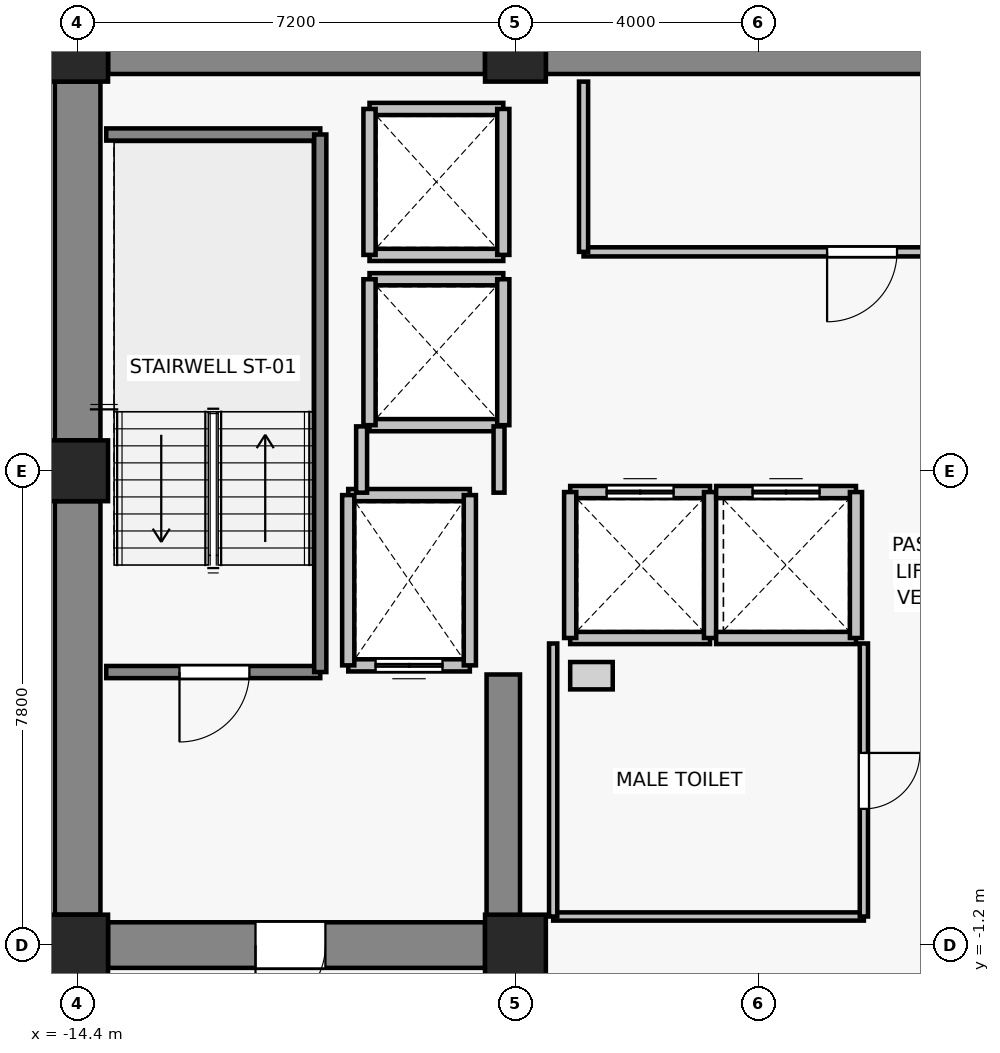
"""IFC4 building model, lengths in metres.
Left out: names, types, materials, properties, quantities, classifications, styles, units other than length and angle.
Written with IfcOpenShell. Run it as: python <this file> out.ifc"""

import sys

from ifc_helpers import new_model, si_unit, direction, frame, frame_2d, origin, origin_2d, place, context, subcontext, project, spatial, rectangle, extrude, source, transform, mapped, element, fill, save


model = new_model("IFC4")
c1 = context("Model", 3, precision=1e-05, world=origin(), true_north=direction((0.0, 1.0)))
c2 = subcontext(c1, "Body", "Model", "MODEL_VIEW")
j1 = project(units=[si_unit("LENGTHUNIT", "METRE"), si_unit("PLANEANGLEUNIT", "RADIAN")], contexts=[c1])
p1 = place(None, origin())
s1 = spatial("IfcSite", under=j1, at=p1, CompositionType="ELEMENT")
p2 = place(p1, origin())
s2 = spatial("IfcBuilding", under=s1, at=p2, CompositionType="ELEMENT")
p3 = place(p2, frame((0.0, 0.0, 103.3)))
s3 = spatial("IfcBuildingStorey", under=s2, at=p3, CompositionType="ELEMENT", Elevation=103.3)
for number, where, z_axis, x_axis in (
    (1, (-14.4, -1.2, 0.0), (0.0, 0.0, 1.0), (1.0, 0.0, 0.0)),
    (2, (-7.2, -1.2, 0.0), (0.0, 0.0, 1.0), (1.0, 0.0, 0.0)),
    (3, (-14.4, 6.6, 0.0), (0.0, 0.0, 1.0), (1.0, 0.0, 0.0)),
    (4, (-14.4, 13.5, 0.0), (0.0, 0.0, 1.0), (1.0, 0.0, 0.0)),
    (5, (-7.2, 13.5, 0.0), (0.0, 0.0, 1.0), (1.0, 0.0, 0.0)),
):
    element("IfcColumn", number, at=place(p3, frame(where, z_axis=z_axis, x_axis=x_axis)), inside=s3, PredefinedType="COLUMN", context=c2, shape_type="SweptSolid", body=[
        extrude(rectangle(XDim=1.0, YDim=1.0, at=origin_2d()), origin(), (0.0, 0.0, 1.0), 3.3),
    ])
p4 = place(p3, frame((-13.9, 13.5, 0.0), z_axis=(0.0, 0.0, 1.0), x_axis=(1.0, 0.0, 0.0)))
e6 = element("IfcWall", 6, at=p4, inside=s3, PredefinedType="SHEAR", context=c2, shape_type="SweptSolid", body=[
    extrude(rectangle(XDim=6.2, YDim=0.75, at=frame_2d((3.1, 0.0))), origin(), (0.0, 0.0, 1.0), 3.075),
])
p5 = place(p3, frame((-6.7, 13.5, 0.0), z_axis=(0.0, 0.0, 1.0), x_axis=(1.0, 0.0, 0.0)))
e7 = element("IfcWall", 7, at=p5, inside=s3, PredefinedType="SHEAR", context=c2, shape_type="SweptSolid", body=[
    extrude(rectangle(XDim=13.4, YDim=0.75, at=frame_2d((6.7, 0.0))), origin(), (0.0, 0.0, 1.0), 3.075),
])
p6 = place(p3, frame((-14.4, -0.7, 0.0), z_axis=(0.0, 0.0, 1.0), x_axis=(0.0, 1.0, 0.0)))
e8 = element("IfcWall", 8, at=p6, inside=s3, PredefinedType="SHEAR", context=c2, shape_type="SweptSolid", body=[
    extrude(rectangle(XDim=6.8, YDim=0.75, at=frame_2d((3.4, 0.0))), origin(), (0.0, 0.0, 1.0), 3.075),
])
p7 = place(p3, frame((-14.4, 7.1, 0.0), z_axis=(0.0, 0.0, 1.0), x_axis=(0.0, 1.0, 0.0)))
e9 = element("IfcWall", 9, at=p7, inside=s3, PredefinedType="SHEAR", context=c2, shape_type="SweptSolid", body=[
    extrude(rectangle(XDim=5.9, YDim=0.75, at=frame_2d((2.95, 0.0))), origin(), (0.0, 0.0, 1.0), 3.075),
])
p8 = place(p3, frame((-7.7, -1.2, 0.0), z_axis=(0.0, 0.0, 1.0), x_axis=(-1.0, 0.0, 0.0)))
e10 = element("IfcWall", 10, at=p8, inside=s3, PredefinedType="SHEAR", context=c2, shape_type="SweptSolid", body=[
    extrude(rectangle(XDim=6.2, YDim=0.75, at=frame_2d((3.1, 0.0))), origin(), (0.0, 0.0, 1.0), 3.075),
])
p9 = place(p8, frame((2.625, 0.0, 0.0)))
e11 = element("IfcOpeningElement", 11, at=p9, cuts=e10, PredefinedType="OPENING", context=c2, shape_type="SweptSolid", body=[
    extrude(rectangle(XDim=1.15, YDim=2.15, at=frame_2d((0.575, 1.075))), frame((0.0, 0.385, 0.0), z_axis=(0.0, -1.0, 0.0), x_axis=(1.0, 0.0, 0.0)), (0.0, 0.0, 1.0), 0.77),
])
p10 = place(p3, frame((-7.4, -0.825, 0.0), z_axis=(0.0, 0.0, 1.0), x_axis=(0.0, 1.0, 0.0)))
e12 = element("IfcWall", 12, at=p10, inside=s3, PredefinedType="SHEAR", context=c2, shape_type="SweptSolid", body=[
    extrude(rectangle(XDim=4.075, YDim=0.55, at=frame_2d((2.038, 0.0))), origin(), (0.0, 0.0, 1.0), 3.075),
])
p11 = place(p3, frame((-7.95, 3.4, 0.0), z_axis=(0.0, 0.0, 1.0), x_axis=(-1.0, 0.0, 0.0)))
e13 = element("IfcWall", 13, at=p11, inside=s3, PredefinedType="SOLIDWALL", context=c2, shape_type="SweptSolid", body=[
    extrude(rectangle(XDim=2.0, YDim=0.2, at=frame_2d((1.0, 0.0))), origin(), (0.0, 0.0, 1.0), 3.075),
])
p12 = place(p11, frame((0.45, 0.0, 0.0)))
e14 = element("IfcOpeningElement", 14, at=p12, cuts=e13, PredefinedType="OPENING", context=c2, shape_type="SweptSolid", body=[
    extrude(rectangle(XDim=1.1, YDim=2.2, at=frame_2d((0.55, 1.1))), frame((0.0, 0.11, 0.0), z_axis=(0.0, -1.0, 0.0), x_axis=(1.0, 0.0, 0.0)), (0.0, 0.0, 1.0), 0.22),
])
p13 = place(p3, frame((-9.95, 6.2, 0.0), z_axis=(0.0, 0.0, 1.0), x_axis=(1.0, 0.0, 0.0)))
e15 = element("IfcWall", 15, at=p13, inside=s3, PredefinedType="SOLIDWALL", context=c2, shape_type="SweptSolid", body=[
    extrude(rectangle(XDim=2.0, YDim=0.2, at=frame_2d((1.0, 0.0))), origin(), (0.0, 0.0, 1.0), 3.075),
])
for number, where, z_axis, x_axis in (
    (16, (-9.95, 3.4, 0.0), (0.0, 0.0, 1.0), (0.0, 1.0, 0.0)),
    (17, (-7.95, 6.2, 0.0), (0.0, 0.0, 1.0), (0.0, -1.0, 0.0)),
):
    element("IfcWall", number, at=place(p3, frame(where, z_axis=z_axis, x_axis=x_axis)), inside=s3, PredefinedType="SOLIDWALL", context=c2, shape_type="SweptSolid", body=[
        extrude(rectangle(XDim=2.8, YDim=0.2, at=frame_2d((1.4, 0.0))), origin(), (0.0, 0.0, 1.0), 3.075),
    ])
p14 = place(p3, frame((-4.0, 3.85, 0.0), z_axis=(0.0, 0.0, 1.0), x_axis=(-1.0, 0.0, 0.0)))
e18 = element("IfcWall", 18, at=p14, inside=s3, PredefinedType="SOLIDWALL", context=c2, shape_type="SweptSolid", body=[
    extrude(rectangle(XDim=2.3, YDim=0.2, at=frame_2d((1.15, 0.0))), origin(), (0.0, 0.0, 1.0), 3.075),
])
p15 = place(p3, frame((-6.3, 6.25, 0.0), z_axis=(0.0, 0.0, 1.0), x_axis=(1.0, 0.0, 0.0)))
e19 = element("IfcWall", 19, at=p15, inside=s3, PredefinedType="SOLIDWALL", context=c2, shape_type="SweptSolid", body=[
    extrude(rectangle(XDim=2.3, YDim=0.2, at=frame_2d((1.15, 0.0))), origin(), (0.0, 0.0, 1.0), 3.075),
])
p16 = place(p15, frame((0.6, 0.0, 0.0)))
e20 = element("IfcOpeningElement", 20, at=p16, cuts=e19, PredefinedType="OPENING", context=c2, shape_type="SweptSolid", body=[
    extrude(rectangle(XDim=1.1, YDim=2.2, at=frame_2d((0.55, 1.1))), frame((0.0, 0.11, 0.0), z_axis=(0.0, -1.0, 0.0), x_axis=(1.0, 0.0, 0.0)), (0.0, 0.0, 1.0), 0.22),
])
for number, where, z_axis, x_axis in (
    (21, (-6.3, 3.85, 0.0), (0.0, 0.0, 1.0), (0.0, 1.0, 0.0)),
    (22, (-4.0, 6.25, 0.0), (0.0, 0.0, 1.0), (0.0, -1.0, 0.0)),
):
    element("IfcWall", number, at=place(p3, frame(where, z_axis=z_axis, x_axis=x_axis)), inside=s3, PredefinedType="SOLIDWALL", context=c2, shape_type="SweptSolid", body=[
        extrude(rectangle(XDim=2.4, YDim=0.2, at=frame_2d((1.2, 0.0))), origin(), (0.0, 0.0, 1.0), 3.075),
    ])
p17 = place(p3, frame((-1.6, 3.85, 0.0), z_axis=(0.0, 0.0, 1.0), x_axis=(-1.0, 0.0, 0.0)))
e23 = element("IfcWall", 23, at=p17, inside=s3, PredefinedType="SOLIDWALL", context=c2, shape_type="SweptSolid", body=[
    extrude(rectangle(XDim=2.3, YDim=0.2, at=frame_2d((1.15, 0.0))), origin(), (0.0, 0.0, 1.0), 3.075),
])
p18 = place(p3, frame((-3.9, 6.25, 0.0), z_axis=(0.0, 0.0, 1.0), x_axis=(1.0, 0.0, 0.0)))
e24 = element("IfcWall", 24, at=p18, inside=s3, PredefinedType="SOLIDWALL", context=c2, shape_type="SweptSolid", body=[
    extrude(rectangle(XDim=2.3, YDim=0.2, at=frame_2d((1.15, 0.0))), origin(), (0.0, 0.0, 1.0), 3.075),
])
p19 = place(p18, frame((0.6, 0.0, 0.0)))
e25 = element("IfcOpeningElement", 25, at=p19, cuts=e24, PredefinedType="OPENING", context=c2, shape_type="SweptSolid", body=[
    extrude(rectangle(XDim=1.1, YDim=2.2, at=frame_2d((0.55, 1.1))), frame((0.0, 0.11, 0.0), z_axis=(0.0, -1.0, 0.0), x_axis=(1.0, 0.0, 0.0)), (0.0, 0.0, 1.0), 0.22),
])
p20 = place(p3, frame((-1.6, 6.25, 0.0), z_axis=(0.0, 0.0, 1.0), x_axis=(0.0, -1.0, 0.0)))
e26 = element("IfcWall", 26, at=p20, inside=s3, PredefinedType="SOLIDWALL", context=c2, shape_type="SweptSolid", body=[
    extrude(rectangle(XDim=2.4, YDim=0.2, at=frame_2d((1.2, 0.0))), origin(), (0.0, 0.0, 1.0), 3.075),
])
for number, where, z_axis, x_axis in (
    (27, (-7.4, 7.35, 0.0), (0.0, 0.0, 1.0), (-1.0, 0.0, 0.0)),
    (28, (-9.6, 9.75, 0.0), (0.0, 0.0, 1.0), (1.0, 0.0, 0.0)),
):
    element("IfcWall", number, at=place(p3, frame(where, z_axis=z_axis, x_axis=x_axis)), inside=s3, PredefinedType="SOLIDWALL", context=c2, shape_type="SweptSolid", body=[
        extrude(rectangle(XDim=2.2, YDim=0.2, at=frame_2d((1.1, 0.0))), origin(), (0.0, 0.0, 1.0), 2.515),
    ])
p21 = place(p3, frame((-9.6, 7.35, 0.0), z_axis=(0.0, 0.0, 1.0), x_axis=(0.0, 1.0, 0.0)))
e29 = element("IfcWall", 29, at=p21, inside=s3, PredefinedType="SOLIDWALL", context=c2, shape_type="SweptSolid", body=[
    extrude(rectangle(XDim=2.4, YDim=0.2, at=frame_2d((1.2, 0.0))), origin(), (0.0, 0.0, 1.0), 3.075),
])
p22 = place(p3, frame((-7.4, 9.75, 0.0), z_axis=(0.0, 0.0, 1.0), x_axis=(0.0, -1.0, 0.0)))
e30 = element("IfcWall", 30, at=p22, inside=s3, PredefinedType="SOLIDWALL", context=c2, shape_type="SweptSolid", body=[
    extrude(rectangle(XDim=2.4, YDim=0.2, at=frame_2d((1.2, 0.0))), origin(), (0.0, 0.0, 1.0), 2.515),
])
for number, where, z_axis, x_axis in (
    (31, (-7.4, 10.15, 0.0), (0.0, 0.0, 1.0), (-1.0, 0.0, 0.0)),
    (32, (-9.6, 12.55, 0.0), (0.0, 0.0, 1.0), (1.0, 0.0, 0.0)),
):
    element("IfcWall", number, at=place(p3, frame(where, z_axis=z_axis, x_axis=x_axis)), inside=s3, PredefinedType="SOLIDWALL", context=c2, shape_type="SweptSolid", body=[
        extrude(rectangle(XDim=2.2, YDim=0.2, at=frame_2d((1.1, 0.0))), origin(), (0.0, 0.0, 1.0), 2.515),
    ])
p23 = place(p3, frame((-9.6, 10.15, 0.0), z_axis=(0.0, 0.0, 1.0), x_axis=(0.0, 1.0, 0.0)))
e33 = element("IfcWall", 33, at=p23, inside=s3, PredefinedType="SOLIDWALL", context=c2, shape_type="SweptSolid", body=[
    extrude(rectangle(XDim=2.4, YDim=0.2, at=frame_2d((1.2, 0.0))), origin(), (0.0, 0.0, 1.0), 3.075),
])
p24 = place(p3, frame((-7.4, 12.55, 0.0), z_axis=(0.0, 0.0, 1.0), x_axis=(0.0, -1.0, 0.0)))
e34 = element("IfcWall", 34, at=p24, inside=s3, PredefinedType="SOLIDWALL", context=c2, shape_type="SweptSolid", body=[
    extrude(rectangle(XDim=2.4, YDim=0.2, at=frame_2d((1.2, 0.0))), origin(), (0.0, 0.0, 1.0), 2.515),
])
p25 = place(p3, frame((-10.41, 3.29, 0.0), z_axis=(0.0, 0.0, 1.0), x_axis=(-1.0, 0.0, 0.0)))
e35 = element("IfcWall", 35, at=p25, inside=s3, PredefinedType="SOLIDWALL", context=c2, shape_type="SweptSolid", body=[
    extrude(rectangle(XDim=3.52, YDim=0.2, at=frame_2d((1.76, 0.0))), origin(), (0.0, 0.0, 1.0), 3.075),
])
p26 = place(p25, frame((1.165, 0.0, 0.0)))
e36 = element("IfcOpeningElement", 36, at=p26, cuts=e35, PredefinedType="OPENING", context=c2, shape_type="SweptSolid", body=[
    extrude(rectangle(XDim=1.15, YDim=2.15, at=frame_2d((0.575, 1.075))), frame((0.0, 0.11, 0.0), z_axis=(0.0, -1.0, 0.0), x_axis=(1.0, 0.0, 0.0)), (0.0, 0.0, 1.0), 0.22),
])
p27 = place(p3, frame((-13.93, 12.13, 0.0), z_axis=(0.0, 0.0, 1.0), x_axis=(1.0, 0.0, 0.0)))
e37 = element("IfcWall", 37, at=p27, inside=s3, PredefinedType="SOLIDWALL", context=c2, shape_type="SweptSolid", body=[
    extrude(rectangle(XDim=3.52, YDim=0.2, at=frame_2d((1.76, 0.0))), origin(), (0.0, 0.0, 1.0), 3.075),
])
p28 = place(p3, frame((-10.41, 12.13, 0.0), z_axis=(0.0, 0.0, 1.0), x_axis=(0.0, -1.0, 0.0)))
e38 = element("IfcWall", 38, at=p28, inside=s3, PredefinedType="SOLIDWALL", context=c2, shape_type="SweptSolid", body=[
    extrude(rectangle(XDim=8.84, YDim=0.2, at=frame_2d((4.42, 0.0))), origin(), (0.0, 0.0, 1.0), 3.075),
])
p29 = place(p3, frame((-9.73, 6.24, 0.0), z_axis=(0.0, 0.0, 1.0), x_axis=(0.0, 1.0, 0.0)))
e39 = element("IfcWall", 39, at=p29, inside=s3, PredefinedType="PARTITIONING", context=c2, shape_type="SweptSolid", body=[
    extrude(rectangle(XDim=1.09, YDim=0.18, at=frame_2d((0.545, 0.0))), origin(), (0.0, 0.0, 1.0), 3.075),
])
p30 = place(p3, frame((-7.47, 7.33, 0.0), z_axis=(0.0, 0.0, 1.0), x_axis=(0.0, -1.0, 0.0)))
e40 = element("IfcWall", 40, at=p30, inside=s3, PredefinedType="PARTITIONING", context=c2, shape_type="SweptSolid", body=[
    extrude(rectangle(XDim=1.09, YDim=0.18, at=frame_2d((0.545, 0.0))), origin(), (0.0, 0.0, 1.0), 2.515),
])
p31 = place(p3, frame((6.08, 10.2, 0.0), z_axis=(0.0, 0.0, 1.0), x_axis=(-1.0, 0.0, 0.0)))
e41 = element("IfcWall", 41, at=p31, inside=s3, PredefinedType="PARTITIONING", context=c2, shape_type="SweptSolid", body=[
    extrude(rectangle(XDim=12.16, YDim=0.15, at=frame_2d((6.08, 0.0))), origin(), (0.0, 0.0, 1.0), 3.075),
])
p32 = place(p31, frame((7.005, 0.0, 0.0)))
e42 = element("IfcOpeningElement", 42, at=p32, cuts=e41, PredefinedType="OPENING", context=c2, shape_type="SweptSolid", body=[
    extrude(rectangle(XDim=1.15, YDim=2.15, at=frame_2d((0.575, 1.075))), frame((0.0, 0.085, 0.0), z_axis=(0.0, -1.0, 0.0), x_axis=(1.0, 0.0, 0.0)), (0.0, 0.0, 1.0), 0.17),
])
p33 = place(p3, frame((-6.08, 10.2, 0.0), z_axis=(0.0, 0.0, 1.0), x_axis=(0.0, 1.0, 0.0)))
e43 = element("IfcWall", 43, at=p33, inside=s3, PredefinedType="PARTITIONING", context=c2, shape_type="SweptSolid", body=[
    extrude(rectangle(XDim=2.8, YDim=0.15, at=frame_2d((1.4, 0.0))), origin(), (0.0, 0.0, 1.0), 3.075),
])
p34 = place(p3, frame((-1.47, -0.73, 0.0), z_axis=(0.0, 0.0, 1.0), x_axis=(-1.0, 0.0, 0.0)))
e44 = element("IfcWall", 44, at=p34, inside=s3, PredefinedType="PARTITIONING", context=c2, shape_type="SweptSolid", body=[
    extrude(rectangle(XDim=5.11, YDim=0.135, at=frame_2d((2.555, 0.0))), origin(), (0.0, 0.0, 1.0), 3.075),
])
p35 = place(p3, frame((-6.58, -0.73, 0.0), z_axis=(0.0, 0.0, 1.0), x_axis=(0.0, 1.0, 0.0)))
e45 = element("IfcWall", 45, at=p35, inside=s3, PredefinedType="PARTITIONING", context=c2, shape_type="SweptSolid", body=[
    extrude(rectangle(XDim=4.49, YDim=0.135, at=frame_2d((2.245, 0.0))), origin(), (0.0, 0.0, 1.0), 3.075),
])
p36 = place(p3, frame((-1.47, 3.76, 0.0), z_axis=(0.0, 0.0, 1.0), x_axis=(0.0, -1.0, 0.0)))
e46 = element("IfcWall", 46, at=p36, inside=s3, PredefinedType="PARTITIONING", context=c2, shape_type="SweptSolid", body=[
    extrude(rectangle(XDim=4.49, YDim=0.135, at=frame_2d((2.245, 0.0))), origin(), (0.0, 0.0, 1.0), 3.075),
])
p37 = place(p36, frame((1.8, 0.0, 0.0)))
e47 = element("IfcOpeningElement", 47, at=p37, cuts=e46, PredefinedType="OPENING", context=c2, shape_type="SweptSolid", body=[
    extrude(rectangle(XDim=0.92, YDim=2.1, at=frame_2d((0.46, 1.05))), frame((0.0, 0.077, 0.0), z_axis=(0.0, -1.0, 0.0), x_axis=(1.0, 0.0, 0.0)), (0.0, 0.0, 1.0), 0.155),
])
m1 = source(origin(), c2, "Body", "SweptSolid", [
    extrude(rectangle(XDim=1.1, YDim=2.2, at=frame_2d((0.55, 1.1))), frame((0.0, 0.025, 0.0), z_axis=(0.0, -1.0, 0.0), x_axis=(1.0, 0.0, 0.0)), (0.0, 0.0, 1.0), 0.05),
])
p38 = place(p12, origin())
e48 = element("IfcDoor", 48, at=p38, inside=s3, OperationType="DOUBLE_DOOR_SLIDING", PredefinedType="DOOR", context=c2, shape_type="MappedRepresentation", body=[
    mapped(m1, transform((0.0, 0.0, 0.0), x_axis=(1.0, 0.0, 0.0), y_axis=(0.0, 1.0, 0.0), z_axis=(0.0, 0.0, 1.0), scale=1.0)),
])
fill(e14, e48)
p39 = place(p16, origin())
e49 = element("IfcDoor", 49, at=p39, inside=s3, OperationType="DOUBLE_DOOR_SLIDING", PredefinedType="DOOR", context=c2, shape_type="MappedRepresentation", body=[
    mapped(m1, transform((0.0, 0.0, 0.0), x_axis=(1.0, 0.0, 0.0), y_axis=(0.0, 1.0, 0.0), z_axis=(0.0, 0.0, 1.0), scale=1.0)),
])
fill(e20, e49)
p40 = place(p19, origin())
e50 = element("IfcDoor", 50, at=p40, inside=s3, OperationType="DOUBLE_DOOR_SLIDING", PredefinedType="DOOR", context=c2, shape_type="MappedRepresentation", body=[
    mapped(m1, transform((0.0, 0.0, 0.0), x_axis=(1.0, 0.0, 0.0), y_axis=(0.0, 1.0, 0.0), z_axis=(0.0, 0.0, 1.0), scale=1.0)),
])
fill(e25, e50)
m2 = source(origin(), c2, "Body", "SweptSolid", [
    extrude(rectangle(XDim=1.15, YDim=2.15, at=frame_2d((0.575, 1.075))), frame((0.0, 0.025, 0.0), z_axis=(0.0, -1.0, 0.0), x_axis=(1.0, 0.0, 0.0)), (0.0, 0.0, 1.0), 0.05),
])
p41 = place(p26, origin())
e51 = element("IfcDoor", 51, at=p41, inside=s3, OperationType="SINGLE_SWING_RIGHT", PredefinedType="DOOR", context=c2, shape_type="MappedRepresentation", body=[
    mapped(m2, transform((0.0, 0.0, 0.0), x_axis=(1.0, 0.0, 0.0), y_axis=(0.0, 1.0, 0.0), z_axis=(0.0, 0.0, 1.0), scale=1.0)),
])
fill(e36, e51)
p42 = place(p9, origin())
e52 = element("IfcDoor", 52, at=p42, inside=s3, OperationType="SINGLE_SWING_RIGHT", PredefinedType="DOOR", context=c2, shape_type="MappedRepresentation", body=[
    mapped(m2, transform((0.0, 0.0, 0.0), x_axis=(1.0, 0.0, 0.0), y_axis=(0.0, 1.0, 0.0), z_axis=(0.0, 0.0, 1.0), scale=1.0)),
])
fill(e11, e52)
p43 = place(p32, origin())
e53 = element("IfcDoor", 53, at=p43, inside=s3, OperationType="SINGLE_SWING_RIGHT", PredefinedType="DOOR", context=c2, shape_type="MappedRepresentation", body=[
    mapped(m2, transform((0.0, 0.0, 0.0), x_axis=(1.0, 0.0, 0.0), y_axis=(0.0, 1.0, 0.0), z_axis=(0.0, 0.0, 1.0), scale=1.0)),
])
fill(e42, e53)
m3 = source(origin(), c2, "Body", "SweptSolid", [
    extrude(rectangle(XDim=0.92, YDim=2.1, at=frame_2d((0.46, 1.05))), frame((0.0, 0.025, 0.0), z_axis=(0.0, -1.0, 0.0), x_axis=(1.0, 0.0, 0.0)), (0.0, 0.0, 1.0), 0.05),
])
p44 = place(p37, origin())
e54 = element("IfcDoor", 54, at=p44, inside=s3, OperationType="SINGLE_SWING_LEFT", PredefinedType="DOOR", context=c2, shape_type="MappedRepresentation", body=[
    mapped(m3, transform((0.0, 0.0, 0.0), x_axis=(1.0, 0.0, 0.0), y_axis=(0.0, 1.0, 0.0), z_axis=(0.0, 0.0, 1.0), scale=1.0)),
])
fill(e47, e54)
save(model, sys.argv[1])
